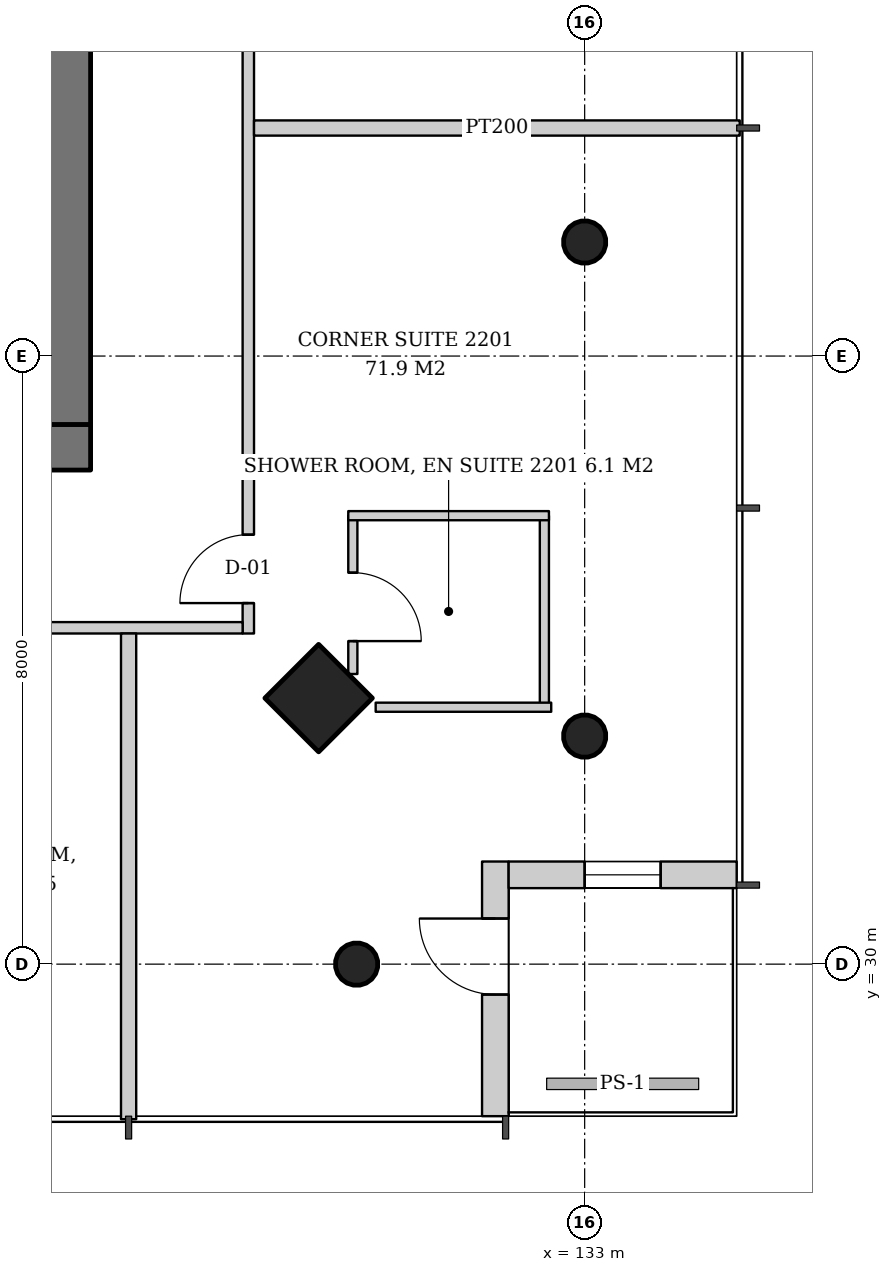
"""IFC4 building model, lengths in metres.
Left out: names, types, materials, properties, quantities, classifications, styles, units other than length and angle.
Written with IfcOpenShell. Run it as: python <this file> out.ifc"""

import sys

from ifc_helpers import new_model, si_unit, direction, frame, frame_2d, origin, origin_2d, place, context, subcontext, project, spatial, rectangle, hollow_circle, extrude, element, fill, save


model = new_model("IFC4")
c1 = context("Model", 3, precision=1e-05, world=origin(), true_north=direction((0.0, 1.0)))
c2 = subcontext(c1, "Body", "Model", "MODEL_VIEW")
j1 = project(units=[si_unit("LENGTHUNIT", "METRE"), si_unit("PLANEANGLEUNIT", "RADIAN")], contexts=[c1])
p1 = place(None, origin())
s1 = spatial("IfcSite", under=j1, at=p1, CompositionType="ELEMENT")
p2 = place(p1, origin())
s2 = spatial("IfcBuilding", under=s1, at=p2, CompositionType="ELEMENT")
p3 = place(p2, frame((0.0, 0.0, 89.4)))
s3 = spatial("IfcBuildingStorey", under=s2, at=p3, CompositionType="ELEMENT", Elevation=89.4)
p4 = place(p3, frame((133.052, 32.948, 0.0), z_axis=(-0.043029647111, 0.043029647111, 0.998146732169), x_axis=(-0.707106781187, -0.707106781187, 0.0)))
e1 = element("IfcColumn", 1, at=p4, inside=s3, PredefinedType="COLUMN", context=c2, shape_type="SweptSolid", body=[
    extrude(hollow_circle(Radius=0.28, WallThickness=0.02, at=origin_2d()), origin(), (0.0, 0.0, 1.0), 3.807),
])
p5 = place(p3, frame((133.052, 39.474, 0.0), z_axis=(-0.043059525333, 0.021561848751, 0.998839808957), x_axis=(-0.44774654769, -0.894160516368, 0.0)))
e2 = element("IfcColumn", 2, at=p5, inside=s3, PredefinedType="COLUMN", context=c2, shape_type="SweptSolid", body=[
    extrude(hollow_circle(Radius=0.28, WallThickness=0.02, at=origin_2d()), origin(), (0.0, 0.0, 1.0), 3.804),
])
p6 = place(p3, frame((129.552, 33.448, 0.0), z_axis=(-0.043029647111, 0.043029647111, 0.998146732169), x_axis=(-0.707106781187, -0.707106781187, 0.0)))
e3 = element("IfcColumn", 3, at=p6, inside=s3, PredefinedType="COLUMN", context=c2, shape_type="SweptSolid", body=[
    extrude(rectangle(XDim=1.0, YDim=1.0, at=origin_2d()), origin(), (0.0, 0.0, 1.0), 3.807),
])
p7 = place(p3, frame((130.052, 29.948, 0.0), z_axis=(-0.043029647111, 0.043029647111, 0.998146732169), x_axis=(-0.707106781187, -0.707106781187, 0.0)))
e4 = element("IfcColumn", 4, at=p7, inside=s3, PredefinedType="COLUMN", context=c2, shape_type="SweptSolid", body=[
    extrude(hollow_circle(Radius=0.28, WallThickness=0.02, at=origin_2d()), origin(), (0.0, 0.0, 1.0), 3.807),
])
p8 = place(p3, frame((107.5, 36.8, 0.0), z_axis=(0.0, 0.0, 1.0), x_axis=(1.0, 0.0, 0.0)))
e5 = element("IfcWall", 5, at=p8, inside=s3, PredefinedType="SHEAR", context=c2, shape_type="SweptSolid", body=[
    extrude(rectangle(XDim=19.0, YDim=0.6, at=frame_2d((9.5, 0.0))), origin(), (0.0, 0.0, 1.0), 3.8),
])
p9 = place(p8, frame((3.9, 0.0, 0.0)))
e6 = element("IfcOpeningElement", 6, at=p9, cuts=e5, PredefinedType="OPENING", context=c2, shape_type="SweptSolid", body=[
    extrude(rectangle(XDim=1.0, YDim=2.1, at=frame_2d((0.5, 1.05))), frame((0.0, 0.31, 0.0), z_axis=(0.0, -1.0, 0.0), x_axis=(1.0, 0.0, 0.0)), (0.0, 0.0, 1.0), 0.62),
])
p10 = place(p8, frame((14.472, 0.0, 0.0)))
e7 = element("IfcOpeningElement", 7, at=p10, cuts=e5, PredefinedType="OPENING", context=c2, shape_type="SweptSolid", body=[
    extrude(rectangle(XDim=1.0, YDim=2.1, at=frame_2d((0.5, 1.05))), frame((0.0, 0.31, 0.0), z_axis=(0.0, -1.0, 0.0), x_axis=(1.0, 0.0, 0.0)), (0.0, 0.0, 1.0), 0.62),
])
p11 = place(p8, frame((16.365, 0.0, 0.0)))
e8 = element("IfcOpeningElement", 8, at=p11, cuts=e5, PredefinedType="OPENING", context=c2, shape_type="SweptSolid", body=[
    extrude(rectangle(XDim=1.0, YDim=2.1, at=frame_2d((0.5, 1.05))), frame((0.0, 0.31, 0.0), z_axis=(0.0, -1.0, 0.0), x_axis=(1.0, 0.0, 0.0)), (0.0, 0.0, 1.0), 0.62),
])
p12 = place(p3, frame((126.2, 37.1, 0.0), z_axis=(0.0, 0.0, 1.0), x_axis=(0.0, 1.0, 0.0)))
e9 = element("IfcWall", 9, at=p12, inside=s3, PredefinedType="SHEAR", context=c2, shape_type="SweptSolid", body=[
    extrude(rectangle(XDim=17.8, YDim=0.6, at=frame_2d((8.9, 0.0))), origin(), (0.0, 0.0, 1.0), 3.8),
])
p13 = place(p12, frame((8.0, 0.0, 0.0)))
e10 = element("IfcOpeningElement", 10, at=p13, cuts=e9, PredefinedType="OPENING", context=c2, shape_type="SweptSolid", body=[
    extrude(rectangle(XDim=1.8, YDim=2.4, at=frame_2d((0.9, 1.2))), frame((0.0, 0.31, 0.0), z_axis=(0.0, -1.0, 0.0), x_axis=(1.0, 0.0, 0.0)), (0.0, 0.0, 1.0), 0.62),
])
p14 = place(p3, frame((131.825, 28.0, 0.0), z_axis=(0.0, 0.0, 1.0), x_axis=(0.0, 1.0, 0.0)))
e11 = element("IfcWall", 11, at=p14, inside=s3, PredefinedType="SOLIDWALL", context=c2, shape_type="SweptSolid", body=[
    extrude(rectangle(XDim=3.35, YDim=0.35, at=frame_2d((1.675, 0.0))), origin(), (0.0, 0.0, 1.0), 3.6),
])
p15 = place(p14, frame((1.6, 0.0, 0.0)))
e12 = element("IfcOpeningElement", 12, at=p15, cuts=e11, PredefinedType="OPENING", context=c2, shape_type="SweptSolid", body=[
    extrude(rectangle(XDim=1.0, YDim=2.4, at=frame_2d((0.5, 1.2))), frame((0.0, 0.185, 0.0), z_axis=(0.0, -1.0, 0.0), x_axis=(1.0, 0.0, 0.0)), (0.0, 0.0, 1.0), 0.37),
])
p16 = place(p3, frame((132.0, 31.175, 0.0), z_axis=(0.0, 0.0, 1.0), x_axis=(1.0, 0.0, 0.0)))
e13 = element("IfcWall", 13, at=p16, inside=s3, PredefinedType="SOLIDWALL", context=c2, shape_type="SweptSolid", body=[
    extrude(rectangle(XDim=3.0, YDim=0.35, at=frame_2d((1.5, 0.0))), origin(), (0.0, 0.0, 1.0), 3.6),
])
p17 = place(p16, frame((1.0, 0.0, 0.9)))
e14 = element("IfcOpeningElement", 14, at=p17, cuts=e13, PredefinedType="OPENING", context=c2, shape_type="SweptSolid", body=[
    extrude(rectangle(XDim=1.0, YDim=2.4, at=frame_2d((0.5, 1.2))), frame((0.0, 0.185, 0.0), z_axis=(0.0, -1.0, 0.0), x_axis=(1.0, 0.0, 0.0)), (0.0, 0.0, 1.0), 0.37),
])
p18 = place(p3, frame((129.95, 35.9, 0.0), z_axis=(0.0, 0.0, 1.0), x_axis=(0.0, -1.0, 0.0)))
e15 = element("IfcWall", 15, at=p18, inside=s3, PredefinedType="PARTITIONING", context=c2, shape_type="SweptSolid", body=[
    extrude(rectangle(XDim=2.083, YDim=0.12, at=frame_2d((1.042, 0.0))), origin(), (0.0, 0.0, 1.0), 3.6),
])
p19 = place(p18, frame((0.75, 0.0, 0.0)))
e16 = element("IfcOpeningElement", 16, at=p19, cuts=e15, PredefinedType="OPENING", context=c2, shape_type="SweptSolid", body=[
    extrude(rectangle(XDim=0.9, YDim=2.1, at=frame_2d((0.45, 1.05))), frame((0.0, 0.07, 0.0), z_axis=(0.0, -1.0, 0.0), x_axis=(1.0, 0.0, 0.0)), (0.0, 0.0, 1.0), 0.14),
])
p20 = place(p3, frame((132.47, 35.9, 0.0), z_axis=(0.0, 0.0, 1.0), x_axis=(0.0, -1.0, 0.0)))
e17 = element("IfcWall", 17, at=p20, inside=s3, PredefinedType="PARTITIONING", context=c2, shape_type="SweptSolid", body=[
    extrude(rectangle(XDim=2.58, YDim=0.12, at=frame_2d((1.29, 0.0))), origin(), (0.0, 0.0, 1.0), 3.2),
])
p21 = place(p3, frame((130.25, 33.38, 0.0), z_axis=(0.0, 0.0, 1.0), x_axis=(1.0, 0.0, 0.0)))
e18 = element("IfcWall", 18, at=p21, inside=s3, PredefinedType="PARTITIONING", context=c2, shape_type="SweptSolid", body=[
    extrude(rectangle(XDim=2.31, YDim=0.12, at=frame_2d((1.155, 0.0))), origin(), (0.0, 0.0, 1.0), 3.2),
])
p22 = place(p3, frame((129.89, 35.9, 0.0), z_axis=(0.0, 0.0, 1.0), x_axis=(1.0, 0.0, 0.0)))
e19 = element("IfcWall", 19, at=p22, inside=s3, PredefinedType="PARTITIONING", context=c2, shape_type="SweptSolid", body=[
    extrude(rectangle(XDim=2.64, YDim=0.12, at=frame_2d((1.32, 0.0))), origin(), (0.0, 0.0, 1.0), 3.6),
])
p23 = place(p3, frame((128.575, 34.35, 0.0), z_axis=(0.0, 0.0, 1.0), x_axis=(0.0, 1.0, 0.0)))
e20 = element("IfcWall", 20, at=p23, inside=s3, PredefinedType="PARTITIONING", context=c2, shape_type="SweptSolid", body=[
    extrude(rectangle(XDim=23.15, YDim=0.15, at=frame_2d((11.575, 0.0))), origin(), (0.0, 0.0, 1.0), 2.9),
])
p24 = place(p23, frame((0.4, 0.0, 0.0)))
e21 = element("IfcOpeningElement", 21, at=p24, cuts=e20, PredefinedType="OPENING", context=c2, shape_type="SweptSolid", body=[
    extrude(rectangle(XDim=0.9, YDim=2.1, at=frame_2d((0.45, 1.05))), frame((0.0, 0.085, 0.0), z_axis=(0.0, -1.0, 0.0), x_axis=(1.0, 0.0, 0.0)), (0.0, 0.0, 1.0), 0.17),
])
p25 = place(p23, frame((8.0, 0.0, 0.0)))
e22 = element("IfcOpeningElement", 22, at=p25, cuts=e20, PredefinedType="OPENING", context=c2, shape_type="SweptSolid", body=[
    extrude(rectangle(XDim=0.9, YDim=2.1, at=frame_2d((0.45, 1.05))), frame((0.0, 0.085, 0.0), z_axis=(0.0, -1.0, 0.0), x_axis=(1.0, 0.0, 0.0)), (0.0, 0.0, 1.0), 0.17),
])
p26 = place(p23, frame((14.4, 0.0, 0.0)))
e23 = element("IfcOpeningElement", 23, at=p26, cuts=e20, PredefinedType="OPENING", context=c2, shape_type="SweptSolid", body=[
    extrude(rectangle(XDim=0.9, YDim=2.1, at=frame_2d((0.45, 1.05))), frame((0.0, 0.085, 0.0), z_axis=(0.0, -1.0, 0.0), x_axis=(1.0, 0.0, 0.0)), (0.0, 0.0, 1.0), 0.17),
])
p27 = place(p23, frame((18.0, 0.0, 0.0)))
e24 = element("IfcOpeningElement", 24, at=p27, cuts=e20, PredefinedType="OPENING", context=c2, shape_type="SweptSolid", body=[
    extrude(rectangle(XDim=0.9, YDim=2.1, at=frame_2d((0.45, 1.05))), frame((0.0, 0.085, 0.0), z_axis=(0.0, -1.0, 0.0), x_axis=(1.0, 0.0, 0.0)), (0.0, 0.0, 1.0), 0.17),
])
p28 = place(p3, frame((128.65, 41.0, 0.0), z_axis=(0.0, 0.0, 1.0), x_axis=(1.0, 0.0, 0.0)))
e25 = element("IfcWall", 25, at=p28, inside=s3, PredefinedType="PARTITIONING", context=c2, shape_type="SweptSolid", body=[
    extrude(rectangle(XDim=6.39, YDim=0.2, at=frame_2d((3.195, 0.0))), origin(), (0.0, 0.0, 1.0), 3.0),
])
p29 = place(p3, frame((105.35, 34.425, 0.0), z_axis=(0.0, 0.0, 1.0), x_axis=(1.0, 0.0, 0.0)))
e26 = element("IfcWall", 26, at=p29, inside=s3, PredefinedType="PARTITIONING", context=c2, shape_type="SweptSolid", body=[
    extrude(rectangle(XDim=23.15, YDim=0.15, at=frame_2d((11.575, 0.0))), origin(), (0.0, 0.0, 1.0), 2.9),
])
p30 = place(p29, frame((0.4, 0.0, 0.0)))
e27 = element("IfcOpeningElement", 27, at=p30, cuts=e26, PredefinedType="OPENING", context=c2, shape_type="SweptSolid", body=[
    extrude(rectangle(XDim=0.9, YDim=2.1, at=frame_2d((0.45, 1.05))), frame((0.0, 0.085, 0.0), z_axis=(0.0, -1.0, 0.0), x_axis=(1.0, 0.0, 0.0)), (0.0, 0.0, 1.0), 0.17),
])
p31 = place(p29, frame((9.4, 0.0, 0.0)))
e28 = element("IfcOpeningElement", 28, at=p31, cuts=e26, PredefinedType="OPENING", context=c2, shape_type="SweptSolid", body=[
    extrude(rectangle(XDim=0.9, YDim=2.1, at=frame_2d((0.45, 1.05))), frame((0.0, 0.085, 0.0), z_axis=(0.0, -1.0, 0.0), x_axis=(1.0, 0.0, 0.0)), (0.0, 0.0, 1.0), 0.17),
])
p32 = place(p29, frame((13.0, 0.0, 0.0)))
e29 = element("IfcOpeningElement", 29, at=p32, cuts=e26, PredefinedType="OPENING", context=c2, shape_type="SweptSolid", body=[
    extrude(rectangle(XDim=0.9, YDim=2.1, at=frame_2d((0.45, 1.05))), frame((0.0, 0.085, 0.0), z_axis=(0.0, -1.0, 0.0), x_axis=(1.0, 0.0, 0.0)), (0.0, 0.0, 1.0), 0.17),
])
p33 = place(p29, frame((19.4, 0.0, 0.0)))
e30 = element("IfcOpeningElement", 30, at=p33, cuts=e26, PredefinedType="OPENING", context=c2, shape_type="SweptSolid", body=[
    extrude(rectangle(XDim=0.9, YDim=2.1, at=frame_2d((0.45, 1.05))), frame((0.0, 0.085, 0.0), z_axis=(0.0, -1.0, 0.0), x_axis=(1.0, 0.0, 0.0)), (0.0, 0.0, 1.0), 0.17),
])
p34 = place(p3, frame((127.0, 34.35, 0.0), z_axis=(0.0, 0.0, 1.0), x_axis=(0.0, -1.0, 0.0)))
e31 = element("IfcWall", 31, at=p34, inside=s3, PredefinedType="PARTITIONING", context=c2, shape_type="SweptSolid", body=[
    extrude(rectangle(XDim=6.39, YDim=0.2, at=frame_2d((3.195, 0.0))), origin(), (0.0, 0.0, 1.0), 3.2),
])
p35 = place(p15, origin())
e32 = element("IfcDoor", 32, at=p35, inside=s3, OperationType="SINGLE_SWING_RIGHT", PredefinedType="DOOR", context=c2, shape_type="SweptSolid", body=[
    extrude(rectangle(XDim=1.0, YDim=2.4, at=frame_2d((0.5, 1.2))), frame((0.0, 0.025, 0.0), z_axis=(0.0, -1.0, 0.0), x_axis=(1.0, 0.0, 0.0)), (0.0, 0.0, 1.0), 0.05),
])
fill(e12, e32)
p36 = place(p17, origin())
e33 = element("IfcWindow", 33, at=p36, inside=s3, PartitioningType="SINGLE_PANEL", PredefinedType="WINDOW", context=c2, shape_type="SweptSolid", body=[
    extrude(rectangle(XDim=1.0, YDim=2.4, at=frame_2d((0.5, 1.2))), frame((0.0, 0.03, 0.0), z_axis=(0.0, -1.0, 0.0), x_axis=(1.0, 0.0, 0.0)), (0.0, 0.0, 1.0), 0.06),
])
fill(e14, e33)
p37 = place(p19, origin())
e34 = element("IfcDoor", 34, at=p37, inside=s3, OperationType="SINGLE_SWING_RIGHT", PredefinedType="DOOR", context=c2, shape_type="SweptSolid", body=[
    extrude(rectangle(XDim=0.9, YDim=2.1, at=frame_2d((0.45, 1.05))), frame((0.0, 0.025, 0.0), z_axis=(0.0, -1.0, 0.0), x_axis=(1.0, 0.0, 0.0)), (0.0, 0.0, 1.0), 0.05),
])
fill(e16, e34)
p38 = place(p24, origin())
e35 = element("IfcDoor", 35, at=p38, inside=s3, OperationType="SINGLE_SWING_LEFT", PredefinedType="DOOR", context=c2, shape_type="SweptSolid", body=[
    extrude(rectangle(XDim=0.9, YDim=2.1, at=frame_2d((0.45, 1.05))), frame((0.0, 0.025, 0.0), z_axis=(0.0, -1.0, 0.0), x_axis=(1.0, 0.0, 0.0)), (0.0, 0.0, 1.0), 0.05),
])
fill(e21, e35)
save(model, sys.argv[1])
